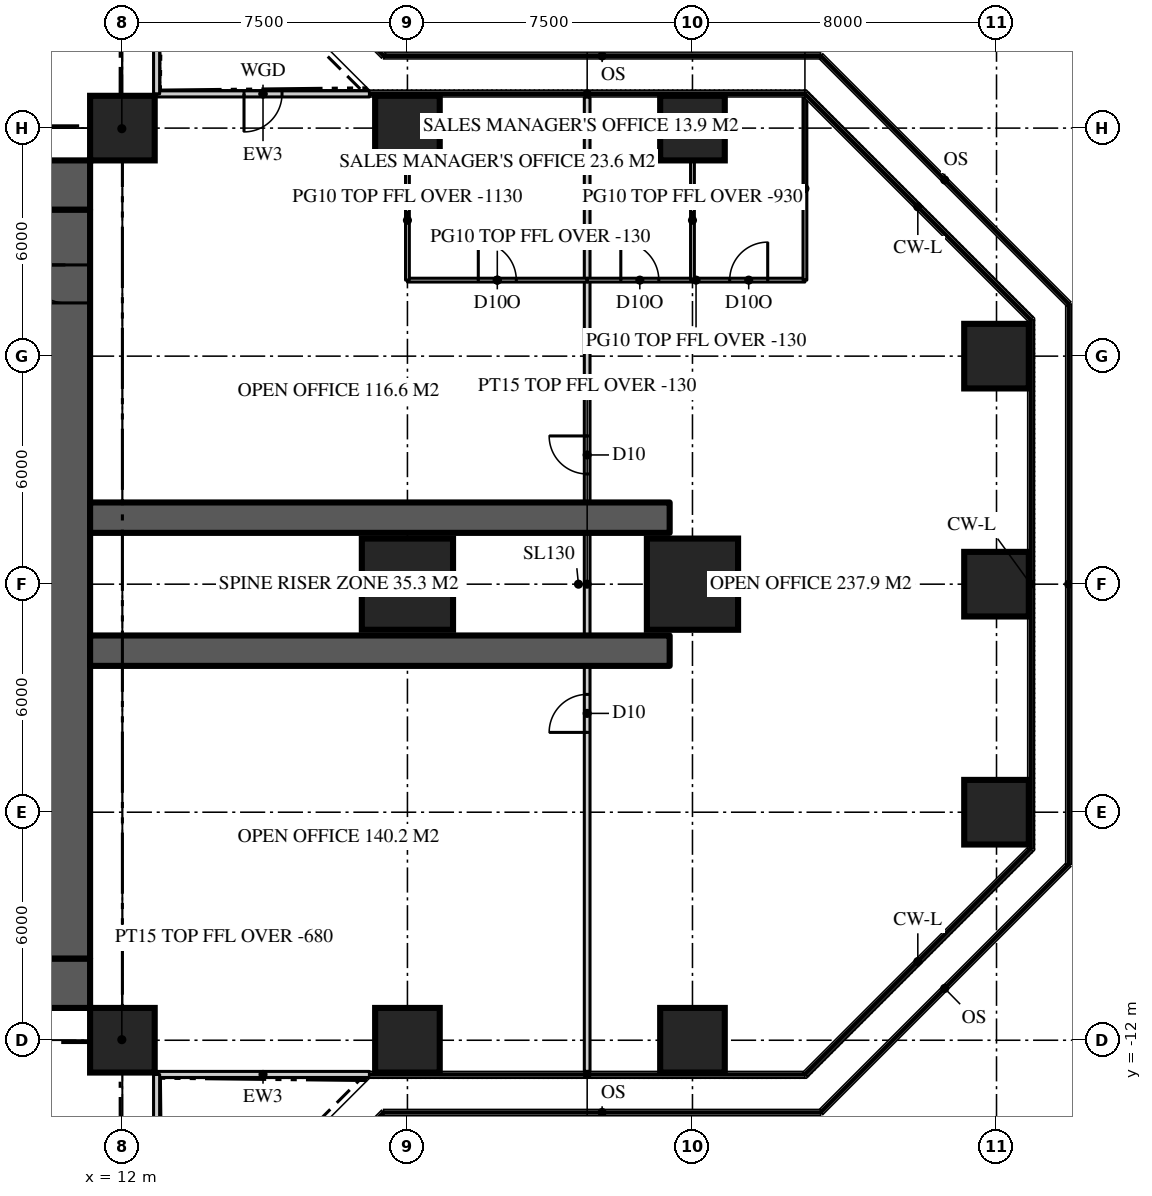
"""IFC4 building model, lengths in metres.
Left out: names, types, materials, properties, quantities, classifications, styles, units other than length and angle.
Written with IfcOpenShell. Run it as: python <this file> out.ifc"""

import sys

from ifc_helpers import new_model, si_unit, direction, frame, frame_2d, origin, origin_2d, place, context, subcontext, project, spatial, rectangle, extrude, element, fill, save


model = new_model("IFC4")
c1 = context("Model", 3, precision=1e-05, world=origin(), true_north=direction((0.0, 1.0)))
c2 = subcontext(c1, "Body", "Model", "MODEL_VIEW")
j1 = project(units=[si_unit("LENGTHUNIT", "METRE"), si_unit("PLANEANGLEUNIT", "RADIAN")], contexts=[c1])
p1 = place(None, origin())
s1 = spatial("IfcSite", under=j1, at=p1, CompositionType="ELEMENT")
p2 = place(p1, origin())
s2 = spatial("IfcBuilding", under=s1, at=p2, CompositionType="ELEMENT")
p3 = place(p2, frame((0.0, 0.0, 98.1)))
s3 = spatial("IfcBuildingStorey", under=s2, at=p3, CompositionType="ELEMENT", Elevation=98.1)
p4 = place(p3, frame((-11.15, 10.5, 0.0), z_axis=(0.0, 0.0, 1.0), x_axis=(1.0, 0.0, 0.0)))
e1 = element("IfcWall", 1, at=p4, inside=s3, PredefinedType="SHEAR", context=c2, shape_type="SweptSolid", body=[
    extrude(rectangle(XDim=22.3, YDim=1.3, at=frame_2d((11.15, 0.0))), origin(), (0.0, 0.0, 1.0), 3.9),
])
p5 = place(p4, frame((4.25, 0.0, 0.0)))
e2 = element("IfcOpeningElement", 2, at=p5, cuts=e1, PredefinedType="OPENING", context=c2, shape_type="SweptSolid", body=[
    extrude(rectangle(XDim=1.8, YDim=2.2, at=frame_2d((0.9, 1.1))), frame((0.0, 0.66, 0.0), z_axis=(0.0, -1.0, 0.0), x_axis=(1.0, 0.0, 0.0)), (0.0, 0.0, 1.0), 1.32),
])
p6 = place(p4, frame((16.25, 0.0, 0.0)))
e3 = element("IfcOpeningElement", 3, at=p6, cuts=e1, PredefinedType="OPENING", context=c2, shape_type="SweptSolid", body=[
    extrude(rectangle(XDim=1.8, YDim=2.2, at=frame_2d((0.9, 1.1))), frame((0.0, 0.66, 0.0), z_axis=(0.0, -1.0, 0.0), x_axis=(1.0, 0.0, 0.0)), (0.0, 0.0, 1.0), 1.32),
])
p7 = place(p3, frame((11.15, -10.5, 0.0), z_axis=(0.0, 0.0, 1.0), x_axis=(-1.0, 0.0, 0.0)))
e4 = element("IfcWall", 4, at=p7, inside=s3, PredefinedType="SHEAR", context=c2, shape_type="SweptSolid", body=[
    extrude(rectangle(XDim=22.3, YDim=1.3, at=frame_2d((11.15, 0.0))), origin(), (0.0, 0.0, 1.0), 3.9),
])
p8 = place(p7, frame((16.25, 0.0, 0.0)))
e5 = element("IfcOpeningElement", 5, at=p8, cuts=e4, PredefinedType="OPENING", context=c2, shape_type="SweptSolid", body=[
    extrude(rectangle(XDim=1.8, YDim=2.2, at=frame_2d((0.9, 1.1))), frame((0.0, 0.66, 0.0), z_axis=(0.0, -1.0, 0.0), x_axis=(1.0, 0.0, 0.0)), (0.0, 0.0, 1.0), 1.32),
])
p9 = place(p7, frame((4.25, 0.0, 0.0)))
e6 = element("IfcOpeningElement", 6, at=p9, cuts=e4, PredefinedType="OPENING", context=c2, shape_type="SweptSolid", body=[
    extrude(rectangle(XDim=1.8, YDim=2.2, at=frame_2d((0.9, 1.1))), frame((0.0, 0.66, 0.0), z_axis=(0.0, -1.0, 0.0), x_axis=(1.0, 0.0, 0.0)), (0.0, 0.0, 1.0), 1.32),
])
p10 = place(p3, frame((10.5, -9.85, 0.0), z_axis=(0.0, 0.0, 1.0), x_axis=(0.0, 1.0, 0.0)))
e7 = element("IfcWall", 7, at=p10, inside=s3, PredefinedType="SHEAR", context=c2, shape_type="SweptSolid", body=[
    extrude(rectangle(XDim=19.7, YDim=1.3, at=frame_2d((9.85, 0.0))), origin(), (0.0, 0.0, 1.0), 3.9),
])
p11 = place(p10, frame((17.25, 0.0, 0.0)))
e8 = element("IfcOpeningElement", 8, at=p11, cuts=e7, PredefinedType="OPENING", context=c2, shape_type="SweptSolid", body=[
    extrude(rectangle(XDim=1.0, YDim=2.2, at=frame_2d((0.5, 1.1))), frame((0.0, 0.66, 0.0), z_axis=(0.0, -1.0, 0.0), x_axis=(1.0, 0.0, 0.0)), (0.0, 0.0, 1.0), 1.32),
])
for number, where, z_axis, x_axis in (
    (9, (11.15, -1.75, 0.0), (0.0, 0.0, 1.0), (1.0, 0.0, 0.0)),
    (10, (11.15, 1.75, 0.0), (0.0, 0.0, 1.0), (1.0, 0.0, 0.0)),
):
    element("IfcWall", number, at=place(p3, frame(where, z_axis=z_axis, x_axis=x_axis)), inside=s3, PredefinedType="SHEAR", context=c2, shape_type="SweptSolid", body=[
        extrude(rectangle(XDim=15.25, YDim=0.8, at=frame_2d((7.625, 0.0))), origin(), (0.0, 0.0, 1.0), 3.9),
    ])
for number, where, z_axis, x_axis in (
    (11, (12.0, -12.0, 0.0), (0.0, 0.0, 1.0), (1.0, 0.0, 0.0)),
    (12, (19.5, -12.0, 0.0), (0.0, 0.0, 1.0), (1.0, 0.0, 0.0)),
    (13, (27.0, -12.0, 0.0), (0.0, 0.0, 1.0), (1.0, 0.0, 0.0)),
    (14, (35.0, -6.0, 0.0), (0.0, 0.0, 1.0), (1.0, 0.0, 0.0)),
):
    element("IfcColumn", number, at=place(p3, frame(where, z_axis=z_axis, x_axis=x_axis)), inside=s3, PredefinedType="COLUMN", context=c2, shape_type="SweptSolid", body=[
        extrude(rectangle(XDim=1.7, YDim=1.7, at=origin_2d()), origin(), (0.0, 0.0, 1.0), 3.9),
    ])
for number, where, z_axis, x_axis in (
    (15, (19.5, 0.0, 0.0), (0.0, 0.0, 1.0), (1.0, 0.0, 0.0)),
    (16, (27.0, 0.0, 0.0), (0.0, 0.0, 1.0), (1.0, 0.0, 0.0)),
):
    element("IfcColumn", number, at=place(p3, frame(where, z_axis=z_axis, x_axis=x_axis)), inside=s3, PredefinedType="COLUMN", context=c2, shape_type="SweptSolid", body=[
        extrude(rectangle(XDim=2.4, YDim=2.4, at=origin_2d()), origin(), (0.0, 0.0, 1.0), 3.9),
    ])
for number, where, z_axis, x_axis in (
    (17, (35.0, 0.0, 0.0), (0.0, 0.0, 1.0), (1.0, 0.0, 0.0)),
    (18, (35.0, 6.0, 0.0), (0.0, 0.0, 1.0), (1.0, 0.0, 0.0)),
    (19, (12.0, 12.0, 0.0), (0.0, 0.0, 1.0), (1.0, 0.0, 0.0)),
    (20, (19.5, 12.0, 0.0), (0.0, 0.0, 1.0), (1.0, 0.0, 0.0)),
    (21, (27.0, 12.0, 0.0), (0.0, 0.0, 1.0), (1.0, 0.0, 0.0)),
):
    element("IfcColumn", number, at=place(p3, frame(where, z_axis=z_axis, x_axis=x_axis)), inside=s3, PredefinedType="COLUMN", context=c2, shape_type="SweptSolid", body=[
        extrude(rectangle(XDim=1.7, YDim=1.7, at=origin_2d()), origin(), (0.0, 0.0, 1.0), 3.9),
    ])
p12 = place(p3, frame((12.9, -12.9, 0.0), z_axis=(0.0, 0.0, 1.0), x_axis=(1.0, 0.0, 0.0)))
e22 = element("IfcWall", 22, at=p12, inside=s3, PredefinedType="SOLIDWALL", context=c2, shape_type="SweptSolid", body=[
    extrude(rectangle(XDim=5.6, YDim=0.16, at=frame_2d((2.8, 0.0))), origin(), (0.0, 0.0, 1.0), 3.77),
])
p13 = place(p3, frame((18.5, 12.9, 0.0), z_axis=(0.0, 0.0, 1.0), x_axis=(-1.0, 0.0, 0.0)))
e23 = element("IfcWall", 23, at=p13, inside=s3, PredefinedType="SOLIDWALL", context=c2, shape_type="SweptSolid", body=[
    extrude(rectangle(XDim=5.6, YDim=0.16, at=frame_2d((2.8, 0.0))), origin(), (0.0, 0.0, 1.0), 3.77),
])
p14 = place(p13, frame((2.3, 0.0, 0.0)))
e24 = element("IfcOpeningElement", 24, at=p14, cuts=e23, PredefinedType="OPENING", context=c2, shape_type="SweptSolid", body=[
    extrude(rectangle(XDim=1.0, YDim=2.2, at=frame_2d((0.5, 1.1))), frame((0.0, 0.09, 0.0), z_axis=(0.0, -1.0, 0.0), x_axis=(1.0, 0.0, 0.0)), (0.0, 0.0, 1.0), 0.18),
])
p15 = place(p3, frame((12.9, 12.9, 0.0), z_axis=(0.0, 0.0, 1.0), x_axis=(0.0, 1.0, 0.0)))
e25 = element("IfcWall", 25, at=p15, inside=s3, PredefinedType="SOLIDWALL", context=c2, shape_type="SweptSolid", body=[
    extrude(rectangle(XDim=5.6, YDim=0.16, at=frame_2d((2.8, 0.0))), origin(), (0.0, 0.0, 1.0), 3.77),
])
p16 = place(p3, frame((12.9, -18.5, 0.0), z_axis=(0.0, 0.0, 1.0), x_axis=(0.0, 1.0, 0.0)))
e26 = element("IfcWall", 26, at=p16, inside=s3, PredefinedType="SOLIDWALL", context=c2, shape_type="SweptSolid", body=[
    extrude(rectangle(XDim=5.6, YDim=0.16, at=frame_2d((2.8, 0.0))), origin(), (0.0, 0.0, 1.0), 3.77),
])
p17 = place(p16, frame((2.3, 0.0, 0.0)))
e27 = element("IfcOpeningElement", 27, at=p17, cuts=e26, PredefinedType="OPENING", context=c2, shape_type="SweptSolid", body=[
    extrude(rectangle(XDim=1.0, YDim=2.2, at=frame_2d((0.5, 1.1))), frame((0.0, 0.09, 0.0), z_axis=(0.0, -1.0, 0.0), x_axis=(1.0, 0.0, 0.0)), (0.0, 0.0, 1.0), 0.18),
])
p18 = place(p3, frame((24.229, -12.82, 0.0), z_axis=(0.0, 0.0, 1.0), x_axis=(0.0, 1.0, 0.0)))
e28 = element("IfcWall", 28, at=p18, inside=s3, PredefinedType="PARTITIONING", context=c2, shape_type="SweptSolid", body=[
    extrude(rectangle(XDim=25.64, YDim=0.15, at=frame_2d((12.82, 0.0))), origin(), (0.0, 0.0, 1.0), 3.77),
])
p19 = place(p18, frame((15.72, 0.0, 0.0)))
e29 = element("IfcOpeningElement", 29, at=p19, cuts=e28, PredefinedType="OPENING", context=c2, shape_type="SweptSolid", body=[
    extrude(rectangle(XDim=1.0, YDim=2.2, at=frame_2d((0.5, 1.1))), frame((0.0, 0.085, 0.0), z_axis=(0.0, -1.0, 0.0), x_axis=(1.0, 0.0, 0.0)), (0.0, 0.0, 1.0), 0.17),
])
p20 = place(p18, frame((8.92, 0.0, 0.0)))
e30 = element("IfcOpeningElement", 30, at=p20, cuts=e28, PredefinedType="OPENING", context=c2, shape_type="SweptSolid", body=[
    extrude(rectangle(XDim=1.0, YDim=2.2, at=frame_2d((0.5, 1.1))), frame((0.0, 0.085, 0.0), z_axis=(0.0, -1.0, 0.0), x_axis=(1.0, 0.0, 0.0)), (0.0, 0.0, 1.0), 0.17),
])
p21 = place(p3, frame((19.5, 8.0, 0.0), z_axis=(0.0, 0.0, 1.0), x_axis=(1.0, 0.0, 0.0)))
e31 = element("IfcWall", 31, at=p21, inside=s3, PredefinedType="PARTITIONING", context=c2, shape_type="SweptSolid", body=[
    extrude(rectangle(XDim=4.729, YDim=0.1, at=frame_2d((2.365, 0.0))), origin(), (0.0, 0.0, 1.0), 3.77),
])
p22 = place(p21, frame((1.865, 0.0, 0.0)))
e32 = element("IfcOpeningElement", 32, at=p22, cuts=e31, PredefinedType="OPENING", context=c2, shape_type="SweptSolid", body=[
    extrude(rectangle(XDim=1.0, YDim=2.2, at=frame_2d((0.5, 1.1))), frame((0.0, 0.06, 0.0), z_axis=(0.0, -1.0, 0.0), x_axis=(1.0, 0.0, 0.0)), (0.0, 0.0, 1.0), 0.12),
])
p23 = place(p3, frame((24.229, 8.0, 0.0), z_axis=(0.0, 0.0, 1.0), x_axis=(1.0, 0.0, 0.0)))
e33 = element("IfcWall", 33, at=p23, inside=s3, PredefinedType="PARTITIONING", context=c2, shape_type="SweptSolid", body=[
    extrude(rectangle(XDim=5.73, YDim=0.1, at=frame_2d((2.865, 0.0))), origin(), (0.0, 0.0, 1.0), 3.77),
])
p24 = place(p23, frame((0.885, 0.0, 0.0)))
e34 = element("IfcOpeningElement", 34, at=p24, cuts=e33, PredefinedType="OPENING", context=c2, shape_type="SweptSolid", body=[
    extrude(rectangle(XDim=1.0, YDim=2.2, at=frame_2d((0.5, 1.1))), frame((0.0, 0.06, 0.0), z_axis=(0.0, -1.0, 0.0), x_axis=(1.0, 0.0, 0.0)), (0.0, 0.0, 1.0), 0.12),
])
p25 = place(p23, frame((3.75, 0.0, 0.0)))
e35 = element("IfcOpeningElement", 35, at=p25, cuts=e33, PredefinedType="OPENING", context=c2, shape_type="SweptSolid", body=[
    extrude(rectangle(XDim=1.0, YDim=2.2, at=frame_2d((0.5, 1.1))), frame((0.0, 0.06, 0.0), z_axis=(0.0, -1.0, 0.0), x_axis=(1.0, 0.0, 0.0)), (0.0, 0.0, 1.0), 0.12),
])
p26 = place(p3, frame((19.5, 8.0, 0.0), z_axis=(0.0, 0.0, 1.0), x_axis=(0.0, 1.0, 0.0)))
e36 = element("IfcWall", 36, at=p26, inside=s3, PredefinedType="PARTITIONING", context=c2, shape_type="SweptSolid", body=[
    extrude(rectangle(XDim=3.15, YDim=0.1, at=frame_2d((1.575, 0.0))), origin(), (0.0, 0.0, 1.0), 2.77),
])
p27 = place(p3, frame((27.0, 8.0, 0.0), z_axis=(0.0, 0.0, 1.0), x_axis=(0.0, 1.0, 0.0)))
e37 = element("IfcWall", 37, at=p27, inside=s3, PredefinedType="PARTITIONING", context=c2, shape_type="SweptSolid", body=[
    extrude(rectangle(XDim=3.15, YDim=0.1, at=frame_2d((1.575, 0.0))), origin(), (0.0, 0.0, 1.0), 2.97),
])
p28 = place(p3, frame((29.959, 8.0, 0.0), z_axis=(0.0, 0.0, 1.0), x_axis=(0.0, 1.0, 0.0)))
e38 = element("IfcWall", 38, at=p28, inside=s3, PredefinedType="PARTITIONING", context=c2, shape_type="SweptSolid", body=[
    extrude(rectangle(XDim=4.82, YDim=0.1, at=frame_2d((2.41, 0.0))), origin(), (0.0, 0.0, 1.0), 3.77),
])
for number, where, z_axis, x_axis in (
    (39, (11.15, 11.15, 0.0), (0.0, 0.0, 1.0), (0.707, 0.707, 0.0)),
    (40, (11.15, -11.15, 0.0), (0.0, 0.0, 1.0), (0.707, -0.707, 0.0)),
):
    element("IfcWall", number, at=place(p3, frame(where, z_axis=z_axis, x_axis=x_axis)), inside=s3, PredefinedType="PARTITIONING", context=c2, shape_type="SweptSolid", body=[
        extrude(rectangle(XDim=2.362, YDim=0.15, at=frame_2d((1.181, 0.0))), origin(), (0.0, 0.0, 1.0), 3.22),
    ])
p29 = place(p14, origin())
e41 = element("IfcDoor", 41, at=p29, inside=s3, OperationType="SINGLE_SWING_RIGHT", PredefinedType="DOOR", context=c2, shape_type="SweptSolid", body=[
    extrude(rectangle(XDim=1.0, YDim=2.2, at=frame_2d((0.5, 1.1))), frame((0.0, 0.025, 0.0), z_axis=(0.0, -1.0, 0.0), x_axis=(1.0, 0.0, 0.0)), (0.0, 0.0, 1.0), 0.05),
])
fill(e24, e41)
p30 = place(p11, origin())
e42 = element("IfcDoor", 42, at=p30, inside=s3, OperationType="SINGLE_SWING_RIGHT", PredefinedType="DOOR", context=c2, shape_type="SweptSolid", body=[
    extrude(rectangle(XDim=1.0, YDim=2.2, at=frame_2d((0.5, 1.1))), frame((0.0, 0.025, 0.0), z_axis=(0.0, -1.0, 0.0), x_axis=(1.0, 0.0, 0.0)), (0.0, 0.0, 1.0), 0.05),
])
fill(e8, e42)
p31 = place(p19, origin())
e43 = element("IfcDoor", 43, at=p31, inside=s3, OperationType="SINGLE_SWING_RIGHT", PredefinedType="DOOR", context=c2, shape_type="SweptSolid", body=[
    extrude(rectangle(XDim=1.0, YDim=2.2, at=frame_2d((0.5, 1.1))), frame((0.0, 0.025, 0.0), z_axis=(0.0, -1.0, 0.0), x_axis=(1.0, 0.0, 0.0)), (0.0, 0.0, 1.0), 0.05),
])
fill(e29, e43)
p32 = place(p20, origin())
e44 = element("IfcDoor", 44, at=p32, inside=s3, OperationType="SINGLE_SWING_LEFT", PredefinedType="DOOR", context=c2, shape_type="SweptSolid", body=[
    extrude(rectangle(XDim=1.0, YDim=2.2, at=frame_2d((0.5, 1.1))), frame((0.0, 0.025, 0.0), z_axis=(0.0, -1.0, 0.0), x_axis=(1.0, 0.0, 0.0)), (0.0, 0.0, 1.0), 0.05),
])
fill(e30, e44)
p33 = place(p22, origin())
e45 = element("IfcDoor", 45, at=p33, inside=s3, OperationType="SINGLE_SWING_LEFT", PredefinedType="DOOR", context=c2, shape_type="SweptSolid", body=[
    extrude(rectangle(XDim=1.0, YDim=2.2, at=frame_2d((0.5, 1.1))), frame((0.0, 0.025, 0.0), z_axis=(0.0, -1.0, 0.0), x_axis=(1.0, 0.0, 0.0)), (0.0, 0.0, 1.0), 0.05),
])
fill(e32, e45)
p34 = place(p24, origin())
e46 = element("IfcDoor", 46, at=p34, inside=s3, OperationType="SINGLE_SWING_LEFT", PredefinedType="DOOR", context=c2, shape_type="SweptSolid", body=[
    extrude(rectangle(XDim=1.0, YDim=2.2, at=frame_2d((0.5, 1.1))), frame((0.0, 0.025, 0.0), z_axis=(0.0, -1.0, 0.0), x_axis=(1.0, 0.0, 0.0)), (0.0, 0.0, 1.0), 0.05),
])
fill(e34, e46)
p35 = place(p25, origin())
e47 = element("IfcDoor", 47, at=p35, inside=s3, OperationType="SINGLE_SWING_RIGHT", PredefinedType="DOOR", context=c2, shape_type="SweptSolid", body=[
    extrude(rectangle(XDim=1.0, YDim=2.2, at=frame_2d((0.5, 1.1))), frame((0.0, 0.025, 0.0), z_axis=(0.0, -1.0, 0.0), x_axis=(1.0, 0.0, 0.0)), (0.0, 0.0, 1.0), 0.05),
])
fill(e35, e47)
save(model, sys.argv[1])
